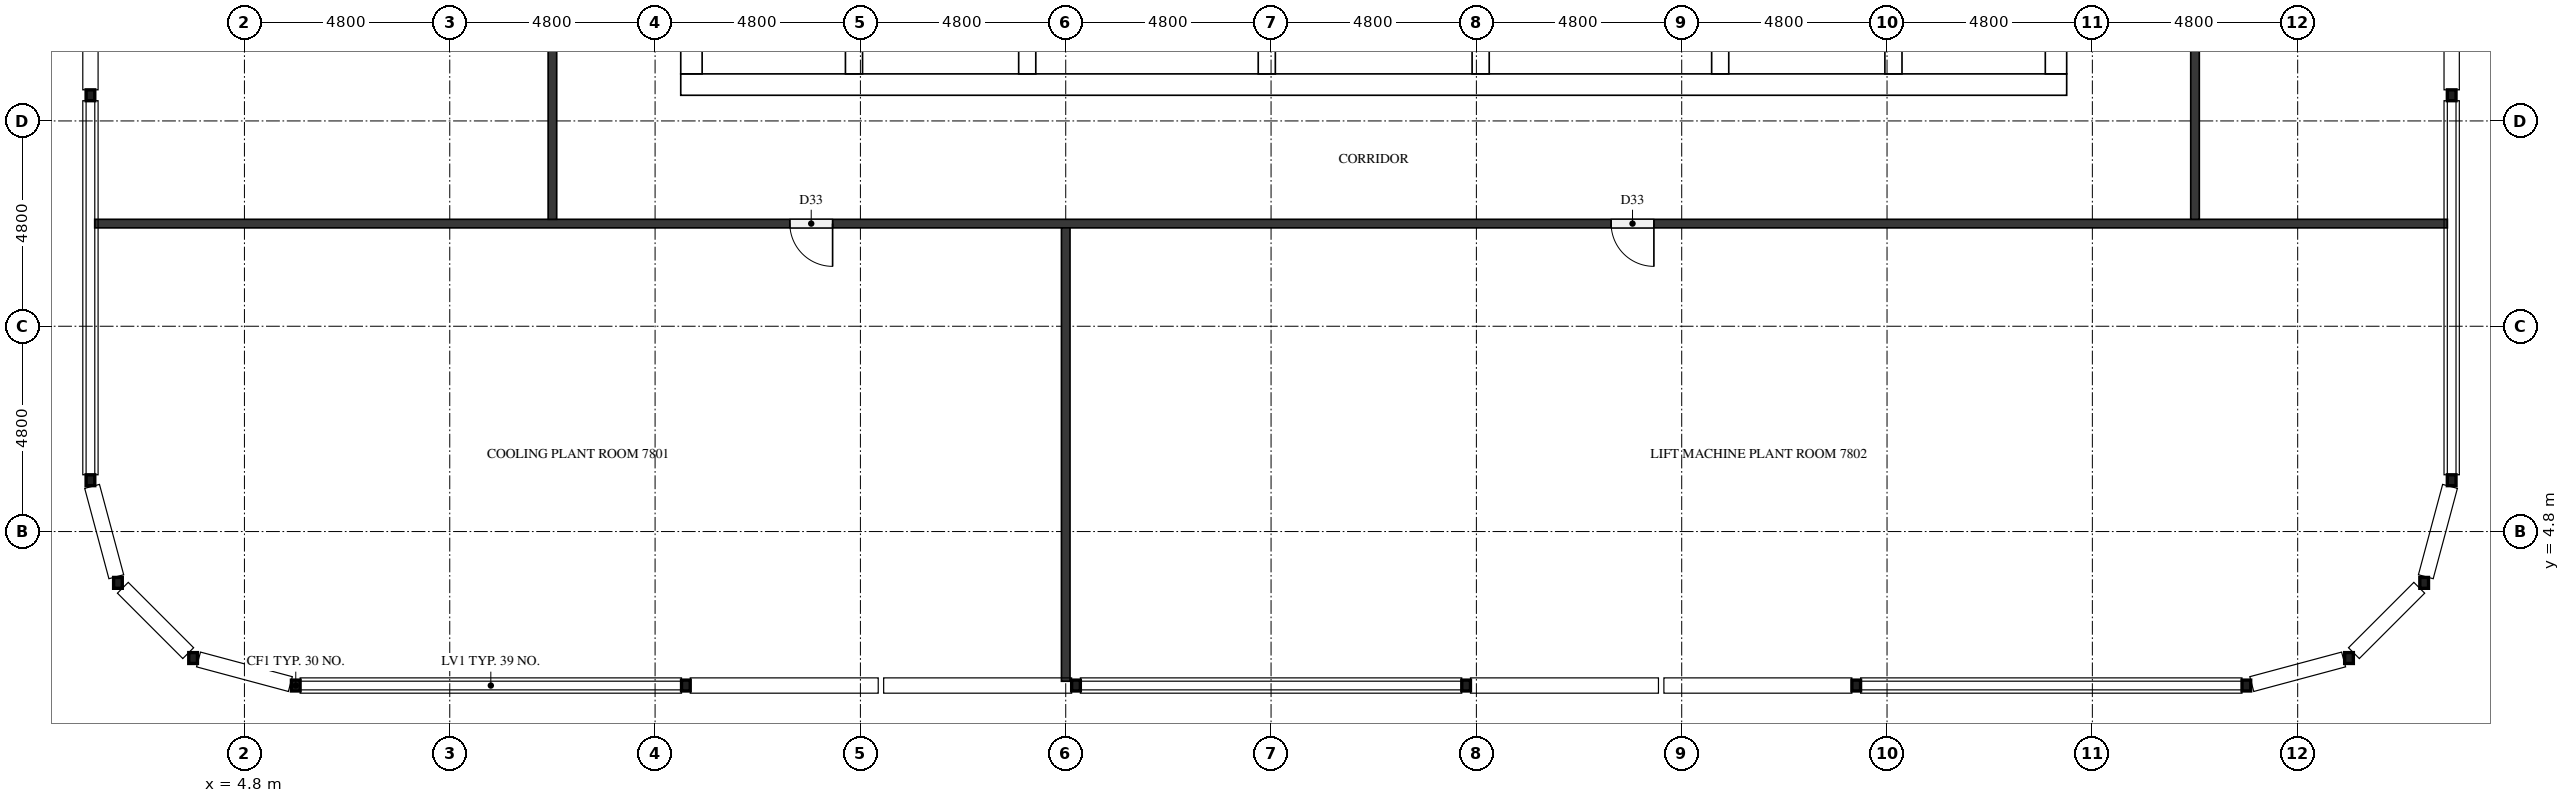
"""IFC4 building model, lengths in metres.
Left out: names, types, materials, properties, quantities, classifications, styles, units other than length and angle.
Written with IfcOpenShell. Run it as: python <this file> out.ifc"""

import sys

from ifc_helpers import new_model, si_unit, direction, frame, frame_2d, origin, origin_2d, place, context, subcontext, project, spatial, rectangle, hollow_rectangle, extrude, element, fill, save


model = new_model("IFC4")
c1 = context("Model", 3, precision=1e-05, world=origin(), true_north=direction((0.0, 1.0)))
c2 = subcontext(c1, "Body", "Model", "MODEL_VIEW")
j1 = project(units=[si_unit("LENGTHUNIT", "METRE"), si_unit("PLANEANGLEUNIT", "RADIAN")], contexts=[c1])
p1 = place(None, origin())
s1 = spatial("IfcSite", under=j1, at=p1, CompositionType="ELEMENT")
p2 = place(p1, origin())
s2 = spatial("IfcBuilding", under=s1, at=p2, CompositionType="ELEMENT")
p3 = place(p2, frame((0.0, 0.0, 301.1)))
s3 = spatial("IfcBuildingStorey", under=s2, at=p3, CompositionType="ELEMENT", Elevation=301.1)
p4 = place(p3, frame((15.0, 15.25, 0.0), z_axis=(0.0, 0.0, 1.0), x_axis=(1.0, 0.0, 0.0)))
e1 = element("IfcWall", 1, at=p4, inside=s3, PredefinedType="SHEAR", context=c2, shape_type="SweptSolid", body=[
    extrude(rectangle(XDim=32.4, YDim=0.5, at=frame_2d((16.2, 0.0))), origin(), (0.0, 0.0, 1.0), 4.4),
])
p5 = place(p4, frame((15.3, 0.0, 0.0)))
e2 = element("IfcOpeningElement", 2, at=p5, cuts=e1, PredefinedType="OPENING", context=c2, shape_type="SweptSolid", body=[
    extrude(rectangle(XDim=1.8, YDim=2.1, at=frame_2d((0.9, 1.05))), frame((0.0, 0.26, 0.0), z_axis=(0.0, -1.0, 0.0), x_axis=(1.0, 0.0, 0.0)), (0.0, 0.0, 1.0), 0.52),
])
p6 = place(p3, frame((15.25, 15.5, 0.0), z_axis=(0.0, 0.0, 1.0), x_axis=(0.0, 1.0, 0.0)))
e3 = element("IfcWall", 3, at=p6, inside=s3, PredefinedType="SHEAR", context=c2, shape_type="SweptSolid", body=[
    extrude(rectangle(XDim=21.8, YDim=0.5, at=frame_2d((10.9, 0.0))), origin(), (0.0, 0.0, 1.0), 4.4),
])
p7 = place(p6, frame((5.26, 0.0, 0.0)))
e4 = element("IfcOpeningElement", 4, at=p7, cuts=e3, PredefinedType="OPENING", context=c2, shape_type="SweptSolid", body=[
    extrude(rectangle(XDim=1.2, YDim=2.1, at=frame_2d((0.6, 1.05))), frame((0.0, 0.26, 0.0), z_axis=(0.0, -1.0, 0.0), x_axis=(1.0, 0.0, 0.0)), (0.0, 0.0, 1.0), 0.52),
])
p8 = place(p3, frame((47.15, 15.5, 0.0), z_axis=(0.0, 0.0, 1.0), x_axis=(0.0, 1.0, 0.0)))
e5 = element("IfcWall", 5, at=p8, inside=s3, PredefinedType="SHEAR", context=c2, shape_type="SweptSolid", body=[
    extrude(rectangle(XDim=21.8, YDim=0.5, at=frame_2d((10.9, 0.0))), origin(), (0.0, 0.0, 1.0), 4.4),
])
p9 = place(p8, frame((10.6, 0.0, 0.0)))
e6 = element("IfcOpeningElement", 6, at=p9, cuts=e5, PredefinedType="OPENING", context=c2, shape_type="SweptSolid", body=[
    extrude(rectangle(XDim=1.2, YDim=2.1, at=frame_2d((0.6, 1.05))), frame((0.0, 0.26, 0.0), z_axis=(0.0, -1.0, 0.0), x_axis=(1.0, 0.0, 0.0)), (0.0, 0.0, 1.0), 0.52),
])
p10 = place(p3, frame((19.05, 15.5, 0.0), z_axis=(0.0, 0.0, 1.0), x_axis=(0.0, 1.0, 0.0)))
e7 = element("IfcWall", 7, at=p10, inside=s3, PredefinedType="SHEAR", context=c2, shape_type="SweptSolid", body=[
    extrude(rectangle(XDim=15.55, YDim=0.4, at=frame_2d((7.775, 0.0))), origin(), (0.0, 0.0, 1.0), 4.4),
])
p11 = place(p10, frame((9.95, 0.0, 0.0)))
e8 = element("IfcOpeningElement", 8, at=p11, cuts=e7, PredefinedType="OPENING", context=c2, shape_type="SweptSolid", body=[
    extrude(rectangle(XDim=1.1, YDim=2.1, at=frame_2d((0.55, 1.05))), frame((0.0, 0.21, 0.0), z_axis=(0.0, -1.0, 0.0), x_axis=(1.0, 0.0, 0.0)), (0.0, 0.0, 1.0), 0.42),
])
p12 = place(p10, frame((13.45, 0.0, 0.0)))
e9 = element("IfcOpeningElement", 9, at=p12, cuts=e7, PredefinedType="OPENING", context=c2, shape_type="SweptSolid", body=[
    extrude(rectangle(XDim=1.1, YDim=2.1, at=frame_2d((0.55, 1.05))), frame((0.0, 0.21, 0.0), z_axis=(0.0, -1.0, 0.0), x_axis=(1.0, 0.0, 0.0)), (0.0, 0.0, 1.0), 0.42),
])
p13 = place(p10, frame((0.7, 0.0, 0.0)))
e10 = element("IfcOpeningElement", 10, at=p13, cuts=e7, PredefinedType="OPENING", context=c2, shape_type="SweptSolid", body=[
    extrude(rectangle(XDim=1.2, YDim=2.1, at=frame_2d((0.6, 1.05))), frame((0.0, 0.21, 0.0), z_axis=(0.0, -1.0, 0.0), x_axis=(1.0, 0.0, 0.0)), (0.0, 0.0, 1.0), 0.42),
])
p14 = place(p3, frame((23.1, 15.5, 0.0), z_axis=(0.0, 0.0, 1.0), x_axis=(0.0, 1.0, 0.0)))
e11 = element("IfcWall", 11, at=p14, inside=s3, PredefinedType="SHEAR", context=c2, shape_type="SweptSolid", body=[
    extrude(rectangle(XDim=21.8, YDim=0.4, at=frame_2d((10.9, 0.0))), origin(), (0.0, 0.0, 1.0), 4.4),
])
p15 = place(p3, frame((39.3, 15.5, 0.0), z_axis=(0.0, 0.0, 1.0), x_axis=(0.0, 1.0, 0.0)))
e12 = element("IfcWall", 12, at=p15, inside=s3, PredefinedType="SHEAR", context=c2, shape_type="SweptSolid", body=[
    extrude(rectangle(XDim=8.75, YDim=0.4, at=frame_2d((4.375, 0.0))), origin(), (0.0, 0.0, 1.0), 4.4),
])
p16 = place(p3, frame((43.35, 15.5, 0.0), z_axis=(0.0, 0.0, 1.0), x_axis=(0.0, 1.0, 0.0)))
e13 = element("IfcWall", 13, at=p16, inside=s3, PredefinedType="SHEAR", context=c2, shape_type="SweptSolid", body=[
    extrude(rectangle(XDim=8.75, YDim=0.4, at=frame_2d((4.375, 0.0))), origin(), (0.0, 0.0, 1.0), 4.4),
])
p17 = place(p16, frame((0.7, 0.0, 0.0)))
e14 = element("IfcOpeningElement", 14, at=p17, cuts=e13, PredefinedType="OPENING", context=c2, shape_type="SweptSolid", body=[
    extrude(rectangle(XDim=1.2, YDim=2.1, at=frame_2d((0.6, 1.05))), frame((0.0, 0.21, 0.0), z_axis=(0.0, -1.0, 0.0), x_axis=(1.0, 0.0, 0.0)), (0.0, 0.0, 1.0), 0.42),
])
for number, where, z_axis, x_axis in (
    (15, (28.7, 15.5, 0.0), (0.0, 0.0, 1.0), (0.0, 1.0, 0.0)),
    (16, (33.7, 15.5, 0.0), (0.0, 0.0, 1.0), (0.0, 1.0, 0.0)),
):
    element("IfcWall", number, at=place(p3, frame(where, z_axis=z_axis, x_axis=x_axis)), inside=s3, PredefinedType="SHEAR", context=c2, shape_type="SweptSolid", body=[
        extrude(rectangle(XDim=3.05, YDim=0.4, at=frame_2d((1.525, 0.0))), origin(), (0.0, 0.0, 1.0), 4.4),
    ])
for number, where, z_axis, x_axis in (
    (17, (6.0, 1.2, 0.0), (0.0, 0.0, 1.0), (1.0, 0.0, 0.0)),
    (18, (15.12, 1.2, 0.0), (0.0, 0.0, 1.0), (1.0, 0.0, 0.0)),
    (19, (24.24, 1.2, 0.0), (0.0, 0.0, 1.0), (1.0, 0.0, 0.0)),
    (20, (33.36, 1.2, 0.0), (0.0, 0.0, 1.0), (1.0, 0.0, 0.0)),
    (21, (42.48, 1.2, 0.0), (0.0, 0.0, 1.0), (1.0, 0.0, 0.0)),
    (22, (51.6, 1.2, 0.0), (0.0, 0.0, 1.0), (1.0, 0.0, 0.0)),
    (23, (54.0, 1.843, 0.0), (0.0, 0.0, 1.0), (1.0, 0.0, 0.0)),
    (24, (55.757, 3.6, 0.0), (0.0, 0.0, 1.0), (1.0, 0.0, 0.0)),
    (25, (56.4, 6.0, 0.0), (0.0, 0.0, 1.0), (1.0, 0.0, 0.0)),
    (26, (56.4, 15.0, 0.0), (0.0, 0.0, 1.0), (1.0, 0.0, 0.0)),
    (27, (1.2, 15.0, 0.0), (0.0, 0.0, 1.0), (1.0, 0.0, 0.0)),
    (28, (1.2, 6.0, 0.0), (0.0, 0.0, 1.0), (1.0, 0.0, 0.0)),
    (29, (1.843, 3.6, 0.0), (0.0, 0.0, 1.0), (1.0, 0.0, 0.0)),
    (30, (3.6, 1.843, 0.0), (0.0, 0.0, 1.0), (1.0, 0.0, 0.0)),
):
    element("IfcColumn", number, at=place(p3, frame(where, z_axis=z_axis, x_axis=x_axis)), inside=s3, PredefinedType="COLUMN", context=c2, shape_type="SweptSolid", body=[
        extrude(hollow_rectangle(XDim=0.203, YDim=0.254, WallThickness=0.01, InnerFilletRadius=0.004, OuterFilletRadius=0.013, at=origin_2d()), origin(), (0.0, 0.0, 1.0), 4.4),
    ])
p18 = place(p3, frame((56.3, 12.0, 0.0), z_axis=(0.0, 0.0, 1.0), x_axis=(-1.0, 0.0, 0.0)))
e31 = element("IfcWall", 31, at=p18, inside=s3, PredefinedType="PARTITIONING", context=c2, shape_type="SweptSolid", body=[
    extrude(rectangle(XDim=55.0, YDim=0.2, at=frame_2d((27.5, 0.0))), origin(), (0.0, 0.0, 1.0), 4.4),
])
p19 = place(p18, frame((37.75, 0.0, 0.0)))
e32 = element("IfcOpeningElement", 32, at=p19, cuts=e31, PredefinedType="OPENING", context=c2, shape_type="SweptSolid", body=[
    extrude(rectangle(XDim=1.0, YDim=2.1, at=frame_2d((0.5, 1.05))), frame((0.0, 0.11, 0.0), z_axis=(0.0, -1.0, 0.0), x_axis=(1.0, 0.0, 0.0)), (0.0, 0.0, 1.0), 0.22),
])
p20 = place(p18, frame((18.55, 0.0, 0.0)))
e33 = element("IfcOpeningElement", 33, at=p20, cuts=e31, PredefinedType="OPENING", context=c2, shape_type="SweptSolid", body=[
    extrude(rectangle(XDim=1.0, YDim=2.1, at=frame_2d((0.5, 1.05))), frame((0.0, 0.11, 0.0), z_axis=(0.0, -1.0, 0.0), x_axis=(1.0, 0.0, 0.0)), (0.0, 0.0, 1.0), 0.22),
])
p21 = place(p3, frame((12.0, 12.1, 0.0), z_axis=(0.0, 0.0, 1.0), x_axis=(0.0, 1.0, 0.0)))
e34 = element("IfcWall", 34, at=p21, inside=s3, PredefinedType="PARTITIONING", context=c2, shape_type="SweptSolid", body=[
    extrude(rectangle(XDim=28.6, YDim=0.2, at=frame_2d((14.3, 0.0))), origin(), (0.0, 0.0, 1.0), 4.4),
])
p22 = place(p21, frame((13.75, 0.0, 0.0)))
e35 = element("IfcOpeningElement", 35, at=p22, cuts=e34, PredefinedType="OPENING", context=c2, shape_type="SweptSolid", body=[
    extrude(rectangle(XDim=1.0, YDim=2.1, at=frame_2d((0.5, 1.05))), frame((0.0, 0.11, 0.0), z_axis=(0.0, -1.0, 0.0), x_axis=(1.0, 0.0, 0.0)), (0.0, 0.0, 1.0), 0.22),
])
p23 = place(p3, frame((24.0, 1.3, 0.0), z_axis=(0.0, 0.0, 1.0), x_axis=(0.0, 1.0, 0.0)))
e36 = element("IfcWall", 36, at=p23, inside=s3, PredefinedType="PARTITIONING", context=c2, shape_type="SweptSolid", body=[
    extrude(rectangle(XDim=10.6, YDim=0.2, at=frame_2d((5.3, 0.0))), origin(), (0.0, 0.0, 1.0), 4.4),
])
p24 = place(p3, frame((50.4, 40.7, 0.0), z_axis=(0.0, 0.0, 1.0), x_axis=(0.0, -1.0, 0.0)))
e37 = element("IfcWall", 37, at=p24, inside=s3, PredefinedType="PARTITIONING", context=c2, shape_type="SweptSolid", body=[
    extrude(rectangle(XDim=28.6, YDim=0.2, at=frame_2d((14.3, 0.0))), origin(), (0.0, 0.0, 1.0), 4.4),
])
p25 = place(p24, frame((13.75, 0.0, 0.0)))
e38 = element("IfcOpeningElement", 38, at=p25, cuts=e37, PredefinedType="OPENING", context=c2, shape_type="SweptSolid", body=[
    extrude(rectangle(XDim=1.0, YDim=2.1, at=frame_2d((0.5, 1.05))), frame((0.0, 0.11, 0.0), z_axis=(0.0, -1.0, 0.0), x_axis=(1.0, 0.0, 0.0)), (0.0, 0.0, 1.0), 0.22),
])
p26 = place(p5, frame((1.8, 0.0, 0.0), z_axis=(0.0, 0.0, 1.0), x_axis=(-1.0, 0.0, 0.0)))
e39 = element("IfcDoor", 39, at=p26, inside=s3, OperationType="DOUBLE_DOOR_SINGLE_SWING", PredefinedType="DOOR", context=c2, shape_type="SweptSolid", body=[
    extrude(rectangle(XDim=1.8, YDim=2.1, at=frame_2d((0.9, 1.05))), frame((0.0, 0.025, 0.0), z_axis=(0.0, -1.0, 0.0), x_axis=(1.0, 0.0, 0.0)), (0.0, 0.0, 1.0), 0.05),
])
fill(e2, e39)
p27 = place(p19, origin())
e40 = element("IfcDoor", 40, at=p27, inside=s3, OperationType="SINGLE_SWING_LEFT", PredefinedType="DOOR", context=c2, shape_type="SweptSolid", body=[
    extrude(rectangle(XDim=1.0, YDim=2.1, at=frame_2d((0.5, 1.05))), frame((0.0, 0.025, 0.0), z_axis=(0.0, -1.0, 0.0), x_axis=(1.0, 0.0, 0.0)), (0.0, 0.0, 1.0), 0.05),
])
fill(e32, e40)
p28 = place(p20, origin())
e41 = element("IfcDoor", 41, at=p28, inside=s3, OperationType="SINGLE_SWING_LEFT", PredefinedType="DOOR", context=c2, shape_type="SweptSolid", body=[
    extrude(rectangle(XDim=1.0, YDim=2.1, at=frame_2d((0.5, 1.05))), frame((0.0, 0.025, 0.0), z_axis=(0.0, -1.0, 0.0), x_axis=(1.0, 0.0, 0.0)), (0.0, 0.0, 1.0), 0.05),
])
fill(e33, e41)
save(model, sys.argv[1])
